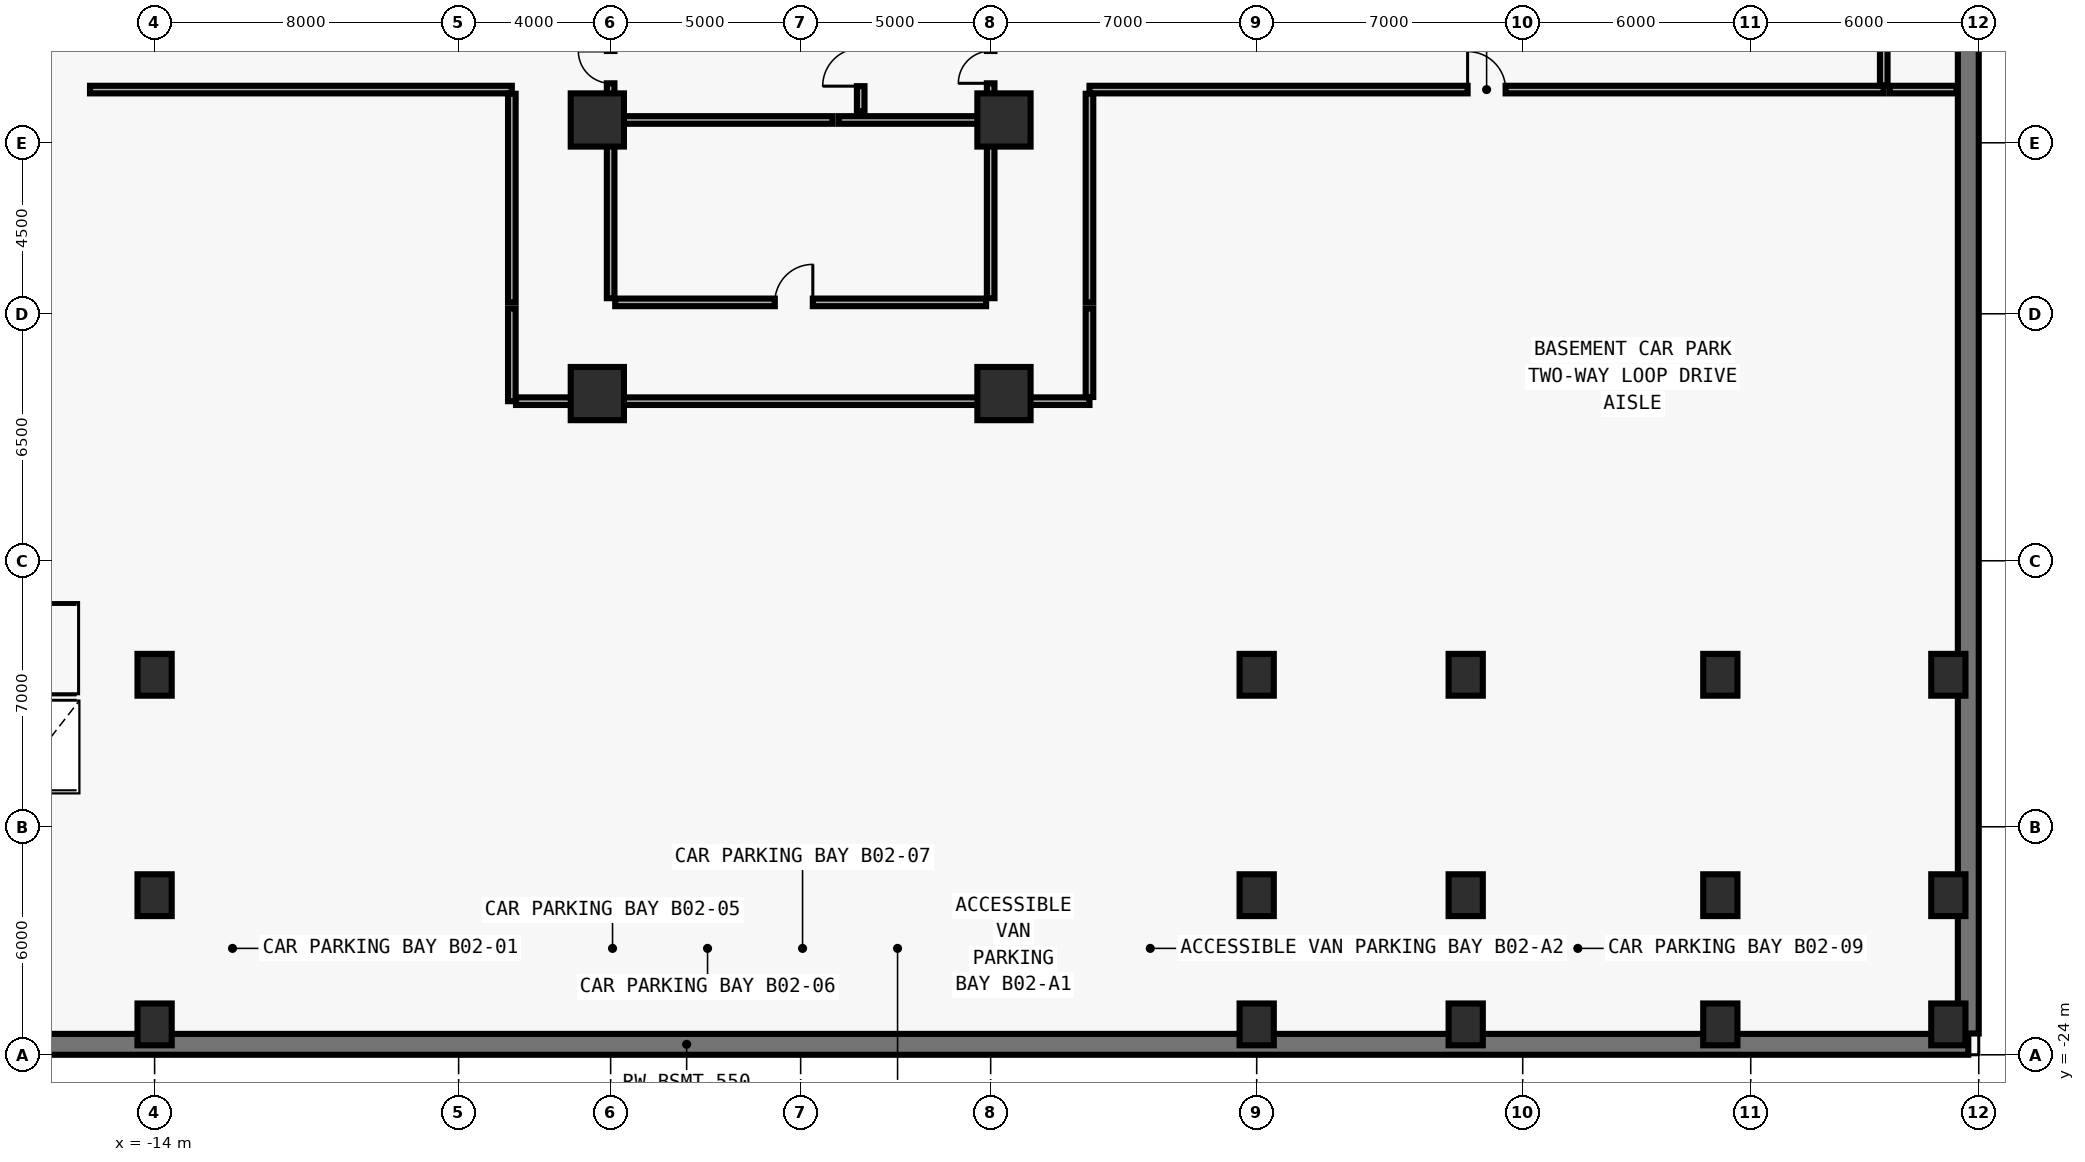
"""IFC4 building model, lengths in metres.
Left out: names, types, materials, properties, quantities, classifications, styles, units other than length and angle.
Written with IfcOpenShell. Run it as: python <this file> out.ifc"""

import sys

from ifc_helpers import new_model, si_unit, direction, frame, frame_2d, origin, origin_2d, place, context, subcontext, project, spatial, rectangle, extrude, element, fill, save


model = new_model("IFC4")
c1 = context("Model", 3, precision=1e-05, world=origin(), true_north=direction((0.0, 1.0)))
c2 = subcontext(c1, "Body", "Model", "MODEL_VIEW")
j1 = project(units=[si_unit("LENGTHUNIT", "METRE"), si_unit("PLANEANGLEUNIT", "RADIAN")], contexts=[c1])
p1 = place(None, origin())
s1 = spatial("IfcSite", under=j1, at=p1, CompositionType="ELEMENT")
p2 = place(p1, origin())
s2 = spatial("IfcBuilding", under=s1, at=p2, CompositionType="ELEMENT")
p3 = place(p2, frame((0.0, 0.0, -9.0)))
s3 = spatial("IfcBuildingStorey", under=s2, at=p3, CompositionType="ELEMENT", Elevation=-9.0)
p4 = place(p3, frame((-33.725, -23.725, 0.0), z_axis=(0.0, 0.0, 1.0), x_axis=(1.0, 0.0, 0.0)))
e1 = element("IfcWall", 1, at=p4, inside=s3, PredefinedType="SOLIDWALL", context=c2, shape_type="SweptSolid", body=[
    extrude(rectangle(XDim=67.45, YDim=0.55, at=frame_2d((33.725, 0.0))), origin(), (0.0, 0.0, 1.0), 4.492),
])
p5 = place(p3, frame((33.725, -23.44, 0.0), z_axis=(0.0, 0.0, 1.0), x_axis=(0.0, 1.0, 0.0)))
e2 = element("IfcWall", 2, at=p5, inside=s3, PredefinedType="SOLIDWALL", context=c2, shape_type="SweptSolid", body=[
    extrude(rectangle(XDim=46.88, YDim=0.55, at=frame_2d((23.44, 0.0))), origin(), (0.0, 0.0, 1.0), 4.492),
])
for number, where, z_axis, x_axis in (
    (3, (-2.35, 0.6, 0.0), (0.0, 0.0, 1.0), (1.0, 0.0, 0.0)),
    (4, (8.35, 0.6, 0.0), (0.0, 0.0, 1.0), (1.0, 0.0, 0.0)),
    (5, (-2.35, -6.6, 0.0), (0.0, 0.0, 1.0), (1.0, 0.0, 0.0)),
    (6, (8.35, -6.6, 0.0), (0.0, 0.0, 1.0), (1.0, 0.0, 0.0)),
):
    element("IfcColumn", number, at=place(p3, frame(where, z_axis=z_axis, x_axis=x_axis)), inside=s3, PredefinedType="COLUMN", context=c2, shape_type="SweptSolid", body=[
        extrude(rectangle(XDim=1.4, YDim=1.4, at=origin_2d()), origin(), (0.0, 0.0, 1.0), 4.475),
    ])
for number, where, z_axis, x_axis in (
    (7, (-14.0, -23.2, 0.0), (0.0, 0.0, 1.0), (1.0, 0.0, 0.0)),
    (8, (-14.0, -19.8, 0.0), (0.0, 0.0, 1.0), (1.0, 0.0, 0.0)),
    (9, (-14.0, -14.0, 0.0), (0.0, 0.0, 1.0), (1.0, 0.0, 0.0)),
    (10, (15.0, -23.2, 0.0), (0.0, 0.0, 1.0), (1.0, 0.0, 0.0)),
    (11, (15.0, -19.8, 0.0), (0.0, 0.0, 1.0), (1.0, 0.0, 0.0)),
    (12, (15.0, -14.0, 0.0), (0.0, 0.0, 1.0), (1.0, 0.0, 0.0)),
    (13, (20.5, -23.2, 0.0), (0.0, 0.0, 1.0), (1.0, 0.0, 0.0)),
    (14, (20.5, -19.8, 0.0), (0.0, 0.0, 1.0), (1.0, 0.0, 0.0)),
    (15, (20.5, -14.0, 0.0), (0.0, 0.0, 1.0), (1.0, 0.0, 0.0)),
    (16, (27.2, -23.2, 0.0), (0.0, 0.0, 1.0), (1.0, 0.0, 0.0)),
    (17, (27.2, -19.8, 0.0), (0.0, 0.0, 1.0), (1.0, 0.0, 0.0)),
    (18, (27.2, -14.0, 0.0), (0.0, 0.0, 1.0), (1.0, 0.0, 0.0)),
    (19, (33.2, -23.2, 0.0), (0.0, 0.0, 1.0), (1.0, 0.0, 0.0)),
    (20, (33.2, -19.8, 0.0), (0.0, 0.0, 1.0), (1.0, 0.0, 0.0)),
    (21, (33.2, -14.0, 0.0), (0.0, 0.0, 1.0), (1.0, 0.0, 0.0)),
):
    element("IfcColumn", number, at=place(p3, frame(where, z_axis=z_axis, x_axis=x_axis)), inside=s3, PredefinedType="COLUMN", context=c2, shape_type="SweptSolid", body=[
        extrude(rectangle(XDim=0.9, YDim=1.1, at=origin_2d()), origin(), (0.0, 0.0, 1.0), 4.475),
    ])
p6 = place(p3, frame((4.0, 0.6, 0.0), z_axis=(0.0, 0.0, 1.0), x_axis=(1.0, 0.0, 0.0)))
e22 = element("IfcWall", 22, at=p6, inside=s3, PredefinedType="SOLIDWALL", context=c2, shape_type="SweptSolid", body=[
    extrude(rectangle(XDim=3.88, YDim=0.2, at=frame_2d((1.94, 0.0))), origin(), (0.0, 0.0, 1.0), 3.362),
])
p7 = place(p3, frame((4.58, 0.83, 0.0), z_axis=(0.0, 0.0, 1.0), x_axis=(0.0, 1.0, 0.0)))
e23 = element("IfcWall", 23, at=p7, inside=s3, PredefinedType="MOVABLE", context=c2, shape_type="SweptSolid", body=[
    extrude(rectangle(XDim=2.14, YDim=0.2, at=frame_2d((1.07, 0.0))), origin(), (0.0, 0.0, 1.0), 4.18),
])
p8 = place(p7, frame((0.66, 0.0, 0.0)))
e24 = element("IfcOpeningElement", 24, at=p8, cuts=e23, PredefinedType="OPENING", context=c2, shape_type="SweptSolid", body=[
    extrude(rectangle(XDim=1.0, YDim=2.1, at=frame_2d((0.5, 1.05))), frame((0.0, 0.11, 0.0), z_axis=(0.0, -1.0, 0.0), x_axis=(1.0, 0.0, 0.0)), (0.0, 0.0, 1.0), 0.22),
])
p9 = place(p3, frame((-2.0, 0.72, 0.0), z_axis=(0.0, 0.0, 1.0), x_axis=(0.0, 1.0, 0.0)))
e25 = element("IfcWall", 25, at=p9, inside=s3, PredefinedType="MOVABLE", context=c2, shape_type="SweptSolid", body=[
    extrude(rectangle(XDim=2.25, YDim=0.2, at=frame_2d((1.125, 0.0))), origin(), (0.0, 0.0, 1.0), 3.262),
])
p10 = place(p9, frame((0.845, 0.0, 0.0)))
e26 = element("IfcOpeningElement", 26, at=p10, cuts=e25, PredefinedType="OPENING", context=c2, shape_type="SweptSolid", body=[
    extrude(rectangle(XDim=0.85, YDim=2.1, at=frame_2d((0.425, 1.05))), frame((0.0, 0.11, 0.0), z_axis=(0.0, -1.0, 0.0), x_axis=(1.0, 0.0, 0.0)), (0.0, 0.0, 1.0), 0.22),
])
p11 = place(p3, frame((8.0, 0.72, 0.0), z_axis=(0.0, 0.0, 1.0), x_axis=(0.0, 1.0, 0.0)))
e27 = element("IfcWall", 27, at=p11, inside=s3, PredefinedType="MOVABLE", context=c2, shape_type="SweptSolid", body=[
    extrude(rectangle(XDim=2.25, YDim=0.2, at=frame_2d((1.125, 0.0))), origin(), (0.0, 0.0, 1.0), 3.262),
])
p12 = place(p11, frame((0.845, 0.0, 0.0)))
e28 = element("IfcOpeningElement", 28, at=p12, cuts=e27, PredefinedType="OPENING", context=c2, shape_type="SweptSolid", body=[
    extrude(rectangle(XDim=0.85, YDim=2.1, at=frame_2d((0.425, 1.05))), frame((0.0, 0.11, 0.0), z_axis=(0.0, -1.0, 0.0), x_axis=(1.0, 0.0, 0.0)), (0.0, 0.0, 1.0), 0.22),
])
p13 = place(p3, frame((-1.88, -4.2, 0.0), z_axis=(0.0, 0.0, 1.0), x_axis=(1.0, 0.0, 0.0)))
e29 = element("IfcWall", 29, at=p13, inside=s3, PredefinedType="MOVABLE", context=c2, shape_type="SweptSolid", body=[
    extrude(rectangle(XDim=9.76, YDim=0.2, at=frame_2d((4.88, 0.0))), origin(), (0.0, 0.0, 1.0), 4.18),
])
p14 = place(p13, frame((4.2, 0.0, 0.0)))
e30 = element("IfcOpeningElement", 30, at=p14, cuts=e29, PredefinedType="OPENING", context=c2, shape_type="SweptSolid", body=[
    extrude(rectangle(XDim=1.0, YDim=2.1, at=frame_2d((0.5, 1.05))), frame((0.0, 0.11, 0.0), z_axis=(0.0, -1.0, 0.0), x_axis=(1.0, 0.0, 0.0)), (0.0, 0.0, 1.0), 0.22),
])
p15 = place(p3, frame((10.6, 1.4, 0.0), z_axis=(0.0, 0.0, 1.0), x_axis=(1.0, 0.0, 0.0)))
e31 = element("IfcWall", 31, at=p15, inside=s3, PredefinedType="MOVABLE", context=c2, shape_type="SweptSolid", body=[
    extrude(rectangle(XDim=20.9, YDim=0.2, at=frame_2d((10.45, 0.0))), origin(), (0.0, 0.0, 1.0), 4.18),
])
p16 = place(p15, frame((9.95, 0.0, 0.0)))
e32 = element("IfcOpeningElement", 32, at=p16, cuts=e31, PredefinedType="OPENING", context=c2, shape_type="SweptSolid", body=[
    extrude(rectangle(XDim=1.0, YDim=2.1, at=frame_2d((0.5, 1.05))), frame((0.0, 0.11, 0.0), z_axis=(0.0, -1.0, 0.0), x_axis=(1.0, 0.0, 0.0)), (0.0, 0.0, 1.0), 0.22),
])
p17 = place(p3, frame((-1.88, 0.6, 0.0), z_axis=(0.0, 0.0, 1.0), x_axis=(1.0, 0.0, 0.0)))
e33 = element("IfcWall", 33, at=p17, inside=s3, PredefinedType="MOVABLE", context=c2, shape_type="SweptSolid", body=[
    extrude(rectangle(XDim=5.72, YDim=0.2, at=frame_2d((2.86, 0.0))), origin(), (0.0, 0.0, 1.0), 3.362),
])
for number, where, z_axis, x_axis in (
    (34, (-2.0, -4.09, 0.0), (0.0, 0.0, 1.0), (0.0, 1.0, 0.0)),
    (35, (8.0, -4.09, 0.0), (0.0, 0.0, 1.0), (0.0, 1.0, 0.0)),
):
    element("IfcWall", number, at=place(p3, frame(where, z_axis=z_axis, x_axis=x_axis)), inside=s3, PredefinedType="MOVABLE", context=c2, shape_type="SweptSolid", body=[
        extrude(rectangle(XDim=4.59, YDim=0.2, at=frame_2d((2.295, 0.0))), origin(), (0.0, 0.0, 1.0), 3.362),
    ])
p18 = place(p3, frame((-15.7, 1.4, 0.0), z_axis=(0.0, 0.0, 1.0), x_axis=(1.0, 0.0, 0.0)))
e36 = element("IfcWall", 36, at=p18, inside=s3, PredefinedType="MOVABLE", context=c2, shape_type="SweptSolid", body=[
    extrude(rectangle(XDim=11.1, YDim=0.2, at=frame_2d((5.55, 0.0))), origin(), (0.0, 0.0, 1.0), 4.18),
])
p19 = place(p3, frame((-2.0, -6.8, 0.0), z_axis=(0.0, 0.0, 1.0), x_axis=(1.0, 0.0, 0.0)))
e37 = element("IfcWall", 37, at=p19, inside=s3, PredefinedType="MOVABLE", context=c2, shape_type="SweptSolid", body=[
    extrude(rectangle(XDim=10.0, YDim=0.2, at=frame_2d((5.0, 0.0))), origin(), (0.0, 0.0, 1.0), 3.362),
])
for number, where, z_axis, x_axis in (
    (38, (-4.6, 1.29, 0.0), (0.0, 0.0, 1.0), (0.0, -1.0, 0.0)),
    (39, (10.6, -4.2, 0.0), (0.0, 0.0, 1.0), (0.0, 1.0, 0.0)),
):
    element("IfcWall", number, at=place(p3, frame(where, z_axis=z_axis, x_axis=x_axis)), inside=s3, PredefinedType="MOVABLE", context=c2, shape_type="SweptSolid", body=[
        extrude(rectangle(XDim=5.49, YDim=0.2, at=frame_2d((2.745, 0.0))), origin(), (0.0, 0.0, 1.0), 4.18),
    ])
p20 = place(p3, frame((-4.6, -4.36, 0.0), z_axis=(0.0, 0.0, 1.0), x_axis=(0.0, -1.0, 0.0)))
e40 = element("IfcWall", 40, at=p20, inside=s3, PredefinedType="MOVABLE", context=c2, shape_type="SweptSolid", body=[
    extrude(rectangle(XDim=2.44, YDim=0.2, at=frame_2d((1.22, 0.0))), origin(), (0.0, 0.0, 1.0), 4.18),
])
p21 = place(p3, frame((-4.49, -6.8, 0.0), z_axis=(0.0, 0.0, 1.0), x_axis=(1.0, 0.0, 0.0)))
e41 = element("IfcWall", 41, at=p21, inside=s3, PredefinedType="MOVABLE", context=c2, shape_type="SweptSolid", body=[
    extrude(rectangle(XDim=2.33, YDim=0.2, at=frame_2d((1.165, 0.0))), origin(), (0.0, 0.0, 1.0), 4.18),
])
p22 = place(p3, frame((8.16, -6.8, 0.0), z_axis=(0.0, 0.0, 1.0), x_axis=(1.0, 0.0, 0.0)))
e42 = element("IfcWall", 42, at=p22, inside=s3, PredefinedType="MOVABLE", context=c2, shape_type="SweptSolid", body=[
    extrude(rectangle(XDim=2.44, YDim=0.2, at=frame_2d((1.22, 0.0))), origin(), (0.0, 0.0, 1.0), 4.18),
])
p23 = place(p3, frame((10.6, -6.69, 0.0), z_axis=(0.0, 0.0, 1.0), x_axis=(0.0, 1.0, 0.0)))
e43 = element("IfcWall", 43, at=p23, inside=s3, PredefinedType="MOVABLE", context=c2, shape_type="SweptSolid", body=[
    extrude(rectangle(XDim=2.33, YDim=0.2, at=frame_2d((1.165, 0.0))), origin(), (0.0, 0.0, 1.0), 4.18),
])
p24 = place(p3, frame((31.5, 1.51, 0.0), z_axis=(0.0, 0.0, 1.0), x_axis=(0.0, 1.0, 0.0)))
e44 = element("IfcWall", 44, at=p24, inside=s3, PredefinedType="MOVABLE", context=c2, shape_type="SweptSolid", body=[
    extrude(rectangle(XDim=2.18, YDim=0.2, at=frame_2d((1.09, 0.0))), origin(), (0.0, 0.0, 1.0), 4.18),
])
p25 = place(p3, frame((31.66, 1.4, 0.0), z_axis=(0.0, 0.0, 1.0), x_axis=(1.0, 0.0, 0.0)))
e45 = element("IfcWall", 45, at=p25, inside=s3, PredefinedType="MOVABLE", context=c2, shape_type="SweptSolid", body=[
    extrude(rectangle(XDim=1.755, YDim=0.2, at=frame_2d((0.877, 0.0))), origin(), (0.0, 0.0, 1.0), 4.18),
])
p26 = place(p8, origin())
e46 = element("IfcDoor", 46, at=p26, inside=s3, OperationType="SINGLE_SWING_LEFT", PredefinedType="DOOR", context=c2, shape_type="SweptSolid", body=[
    extrude(rectangle(XDim=1.0, YDim=2.1, at=frame_2d((0.5, 1.05))), frame((0.0, 0.025, 0.0), z_axis=(0.0, -1.0, 0.0), x_axis=(1.0, 0.0, 0.0)), (0.0, 0.0, 1.0), 0.05),
])
fill(e24, e46)
p27 = place(p10, origin())
e47 = element("IfcDoor", 47, at=p27, inside=s3, OperationType="SINGLE_SWING_RIGHT", PredefinedType="DOOR", context=c2, shape_type="SweptSolid", body=[
    extrude(rectangle(XDim=0.85, YDim=2.1, at=frame_2d((0.425, 1.05))), frame((0.0, 0.025, 0.0), z_axis=(0.0, -1.0, 0.0), x_axis=(1.0, 0.0, 0.0)), (0.0, 0.0, 1.0), 0.05),
])
fill(e26, e47)
p28 = place(p12, origin())
e48 = element("IfcDoor", 48, at=p28, inside=s3, OperationType="SINGLE_SWING_LEFT", PredefinedType="DOOR", context=c2, shape_type="SweptSolid", body=[
    extrude(rectangle(XDim=0.85, YDim=2.1, at=frame_2d((0.425, 1.05))), frame((0.0, 0.025, 0.0), z_axis=(0.0, -1.0, 0.0), x_axis=(1.0, 0.0, 0.0)), (0.0, 0.0, 1.0), 0.05),
])
fill(e28, e48)
p29 = place(p14, origin())
e49 = element("IfcDoor", 49, at=p29, inside=s3, OperationType="SINGLE_SWING_RIGHT", PredefinedType="DOOR", context=c2, shape_type="SweptSolid", body=[
    extrude(rectangle(XDim=1.0, YDim=2.1, at=frame_2d((0.5, 1.05))), frame((0.0, 0.025, 0.0), z_axis=(0.0, -1.0, 0.0), x_axis=(1.0, 0.0, 0.0)), (0.0, 0.0, 1.0), 0.05),
])
fill(e30, e49)
p30 = place(p16, origin())
e50 = element("IfcDoor", 50, at=p30, inside=s3, OperationType="SINGLE_SWING_LEFT", PredefinedType="DOOR", context=c2, shape_type="SweptSolid", body=[
    extrude(rectangle(XDim=1.0, YDim=2.1, at=frame_2d((0.5, 1.05))), frame((0.0, 0.025, 0.0), z_axis=(0.0, -1.0, 0.0), x_axis=(1.0, 0.0, 0.0)), (0.0, 0.0, 1.0), 0.05),
])
fill(e32, e50)
save(model, sys.argv[1])
